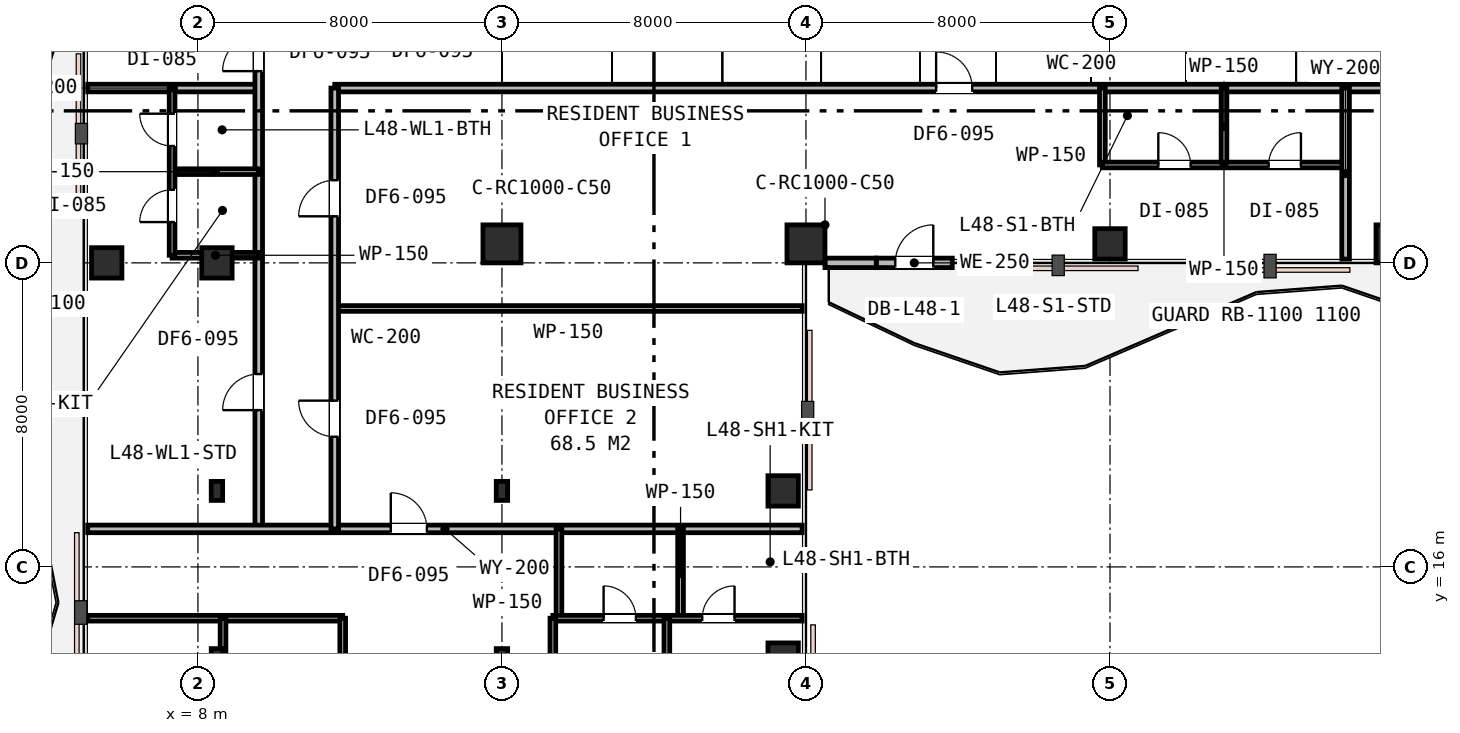
"""IFC4 building model, lengths in metres.
Left out: names, types, materials, properties, quantities, classifications, styles, units other than length and angle.
Written with IfcOpenShell. Run it as: python <this file> out.ifc"""

import sys

from ifc_helpers import new_model, si_unit, direction, frame, frame_2d, origin, origin_2d, place, context, subcontext, project, spatial, rectangle, i_section, extrude, element, fill, save


model = new_model("IFC4")
c1 = context("Model", 3, precision=1e-05, world=origin(), true_north=direction((0.0, 1.0)))
c2 = subcontext(c1, "Body", "Model", "MODEL_VIEW")
j1 = project(units=[si_unit("LENGTHUNIT", "METRE"), si_unit("PLANEANGLEUNIT", "RADIAN")], contexts=[c1])
p1 = place(None, origin())
s1 = spatial("IfcSite", under=j1, at=p1, CompositionType="ELEMENT")
p2 = place(p1, origin())
s2 = spatial("IfcBuilding", under=s1, at=p2, CompositionType="ELEMENT")
p3 = place(p2, frame((0.0, 0.0, 186.6)))
s3 = spatial("IfcBuildingStorey", under=s2, at=p3, CompositionType="ELEMENT", Elevation=186.6)
p4 = place(p3, frame((8.5, 24.0, 0.0), z_axis=(0.0, 0.0, 1.0), x_axis=(1.0, 0.0, 0.0)))
e1 = element("IfcColumn", 1, at=p4, inside=s3, PredefinedType="COLUMN", context=c2, shape_type="SweptSolid", body=[
    extrude(rectangle(XDim=0.8, YDim=0.8, at=origin_2d()), origin(), (0.0, 0.0, 1.0), 3.6),
])
for number, where, z_axis, x_axis in (
    (2, (16.0, 24.5, 0.0), (0.0, 0.0, 1.0), (1.0, 0.0, 0.0)),
    (3, (24.0, 24.5, 0.0), (0.0, 0.0, 1.0), (1.0, 0.0, 0.0)),
):
    element("IfcColumn", number, at=place(p3, frame(where, z_axis=z_axis, x_axis=x_axis)), inside=s3, PredefinedType="COLUMN", context=c2, shape_type="SweptSolid", body=[
        extrude(rectangle(XDim=1.0, YDim=1.0, at=origin_2d()), origin(), (0.0, 0.0, 1.0), 3.6),
    ])
p5 = place(p3, frame((32.0, 24.5, 0.0), z_axis=(0.0, 0.0, 1.0), x_axis=(1.0, 0.0, 0.0)))
e4 = element("IfcColumn", 4, at=p5, inside=s3, PredefinedType="COLUMN", context=c2, shape_type="SweptSolid", body=[
    extrude(rectangle(XDim=0.8, YDim=0.8, at=origin_2d()), origin(), (0.0, 0.0, 1.0), 3.6),
])
p6 = place(p3, frame((39.5, 24.5, 0.0), z_axis=(0.0, 0.0, 1.0), x_axis=(1.0, 0.0, 0.0)))
e5 = element("IfcColumn", 5, at=p6, inside=s3, PredefinedType="COLUMN", context=c2, shape_type="SweptSolid", body=[
    extrude(rectangle(XDim=1.0, YDim=1.0, at=origin_2d()), origin(), (0.0, 0.0, 1.0), 3.6),
])
for number, where, z_axis, x_axis in (
    (6, (5.6, 24.0, 0.0), (0.0, 0.0, 1.0), (1.0, 0.0, 0.0)),
    (7, (23.4, 13.6, 0.0), (0.0, 0.0, 1.0), (1.0, 0.0, 0.0)),
    (8, (23.4, 18.0, 0.0), (0.0, 0.0, 1.0), (1.0, 0.0, 0.0)),
):
    element("IfcColumn", number, at=place(p3, frame(where, z_axis=z_axis, x_axis=x_axis)), inside=s3, PredefinedType="COLUMN", context=c2, shape_type="SweptSolid", body=[
        extrude(rectangle(XDim=0.8, YDim=0.8, at=origin_2d()), origin(), (0.0, 0.0, 1.0), 3.6),
    ])
for number, where, z_axis, x_axis in (
    (9, (8.5, 13.6, 0.0), (0.0, 0.0, 1.0), (1.0, 0.0, 0.0)),
    (10, (16.0, 13.6, 0.0), (0.0, 0.0, 1.0), (1.0, 0.0, 0.0)),
    (11, (8.5, 18.0, 0.0), (0.0, 0.0, 1.0), (1.0, 0.0, 0.0)),
    (12, (16.0, 18.0, 0.0), (0.0, 0.0, 1.0), (1.0, 0.0, 0.0)),
):
    element("IfcColumn", number, at=place(p3, frame(where, z_axis=z_axis, x_axis=x_axis)), inside=s3, PredefinedType="COLUMN", context=c2, shape_type="SweptSolid", body=[
        extrude(i_section(OverallWidth=0.3, OverallDepth=0.5, WebThickness=0.015, FlangeThickness=0.028, FilletRadius=0.027, at=origin_2d()), origin(), (0.0, 0.0, 1.0), 3.6),
    ])
p7 = place(p3, frame((25.85, 24.0, 0.0), z_axis=(0.0, 0.0, 1.0), x_axis=(1.0, 0.0, 0.0)))
e13 = element("IfcWall", 13, at=p7, inside=s3, PredefinedType="STANDARD", context=c2, shape_type="SweptSolid", body=[
    extrude(rectangle(XDim=2.0, YDim=0.25, at=frame_2d((1.0, 0.0))), origin(), (0.0, 0.0, 1.0), 3.02),
])
p8 = place(p7, frame((0.5, 0.0, 0.0)))
e14 = element("IfcOpeningElement", 14, at=p8, cuts=e13, PredefinedType="OPENING", context=c2, shape_type="SweptSolid", body=[
    extrude(rectangle(XDim=1.0, YDim=2.15, at=frame_2d((0.5, 1.075))), frame((0.0, 0.135, 0.0), z_axis=(0.0, -1.0, 0.0), x_axis=(1.0, 0.0, 0.0)), (0.0, 0.0, 1.0), 0.27),
])
p9 = place(p3, frame((24.5, 24.0, 0.0), z_axis=(0.0, 0.0, 1.0), x_axis=(1.0, 0.0, 0.0)))
e15 = element("IfcWall", 15, at=p9, inside=s3, PredefinedType="STANDARD", context=c2, shape_type="SweptSolid", body=[
    extrude(rectangle(XDim=1.35, YDim=0.25, at=frame_2d((0.675, 0.0))), origin(), (0.0, 0.0, 1.0), 3.02),
])
p10 = place(p3, frame((5.1, 28.6, 0.0), z_axis=(0.0, 0.0, 1.0), x_axis=(1.0, 0.0, 0.0)))
e16 = element("IfcWall", 16, at=p10, inside=s3, PredefinedType="PARTITIONING", context=c2, shape_type="SweptSolid", body=[
    extrude(rectangle(XDim=4.5, YDim=0.2, at=frame_2d((2.25, 0.0))), origin(), (0.0, 0.0, 1.0), 2.92),
])
p11 = place(p3, frame((11.6, 28.6, 0.0), z_axis=(0.0, 0.0, 1.0), x_axis=(1.0, 0.0, 0.0)))
e17 = element("IfcWall", 17, at=p11, inside=s3, PredefinedType="PARTITIONING", context=c2, shape_type="SweptSolid", body=[
    extrude(rectangle(XDim=39.3, YDim=0.2, at=frame_2d((19.65, 0.0))), origin(), (0.0, 0.0, 1.0), 2.92),
])
p12 = place(p11, frame((15.825, 0.0, 0.0)))
e18 = element("IfcOpeningElement", 18, at=p12, cuts=e17, PredefinedType="OPENING", context=c2, shape_type="SweptSolid", body=[
    extrude(rectangle(XDim=0.95, YDim=2.15, at=frame_2d((0.475, 1.075))), frame((0.0, 0.11, 0.0), z_axis=(0.0, -1.0, 0.0), x_axis=(1.0, 0.0, 0.0)), (0.0, 0.0, 1.0), 0.22),
])
p13 = place(p11, frame((29.275, 0.0, 0.0)))
e19 = element("IfcOpeningElement", 19, at=p13, cuts=e17, PredefinedType="OPENING", context=c2, shape_type="SweptSolid", body=[
    extrude(rectangle(XDim=0.95, YDim=2.15, at=frame_2d((0.475, 1.075))), frame((0.0, 0.11, 0.0), z_axis=(0.0, -1.0, 0.0), x_axis=(1.0, 0.0, 0.0)), (0.0, 0.0, 1.0), 0.22),
])
p14 = place(p3, frame((9.6, 17.0, 0.0), z_axis=(0.0, 0.0, 1.0), x_axis=(0.0, 1.0, 0.0)))
e20 = element("IfcWall", 20, at=p14, inside=s3, PredefinedType="PARTITIONING", context=c2, shape_type="SweptSolid", body=[
    extrude(rectangle(XDim=25.9, YDim=0.2, at=frame_2d((12.95, 0.0))), origin(), (0.0, 0.0, 1.0), 2.92),
])
p15 = place(p14, frame((12.045, 0.0, 0.0)))
e21 = element("IfcOpeningElement", 21, at=p15, cuts=e20, PredefinedType="OPENING", context=c2, shape_type="SweptSolid", body=[
    extrude(rectangle(XDim=0.95, YDim=2.15, at=frame_2d((0.475, 1.075))), frame((0.0, 0.11, 0.0), z_axis=(0.0, -1.0, 0.0), x_axis=(1.0, 0.0, 0.0)), (0.0, 0.0, 1.0), 0.22),
])
p16 = place(p14, frame((3.125, 0.0, 0.0)))
e22 = element("IfcOpeningElement", 22, at=p16, cuts=e20, PredefinedType="OPENING", context=c2, shape_type="SweptSolid", body=[
    extrude(rectangle(XDim=0.95, YDim=2.15, at=frame_2d((0.475, 1.075))), frame((0.0, 0.11, 0.0), z_axis=(0.0, -1.0, 0.0), x_axis=(1.0, 0.0, 0.0)), (0.0, 0.0, 1.0), 0.22),
])
p17 = place(p3, frame((31.8, 26.576, 0.0), z_axis=(0.0, 0.0, 1.0), x_axis=(0.0, 1.0, 0.0)))
e23 = element("IfcWall", 23, at=p17, inside=s3, PredefinedType="PARTITIONING", context=c2, shape_type="SweptSolid", body=[
    extrude(rectangle(XDim=2.024, YDim=0.15, at=frame_2d((1.012, 0.0))), origin(), (0.0, 0.0, 1.0), 2.92),
])
p18 = place(p3, frame((35.0, 26.576, 0.0), z_axis=(0.0, 0.0, 1.0), x_axis=(0.0, 1.0, 0.0)))
e24 = element("IfcWall", 24, at=p18, inside=s3, PredefinedType="PARTITIONING", context=c2, shape_type="SweptSolid", body=[
    extrude(rectangle(XDim=2.024, YDim=0.15, at=frame_2d((1.012, 0.0))), origin(), (0.0, 0.0, 1.0), 3.07),
])
p19 = place(p3, frame((31.8, 26.576, 0.0), z_axis=(0.0, 0.0, 1.0), x_axis=(1.0, 0.0, 0.0)))
e25 = element("IfcWall", 25, at=p19, inside=s3, PredefinedType="PARTITIONING", context=c2, shape_type="SweptSolid", body=[
    extrude(rectangle(XDim=6.4, YDim=0.15, at=frame_2d((3.2, 0.0))), origin(), (0.0, 0.0, 1.0), 2.92),
])
p20 = place(p19, frame((1.472, 0.0, 0.0)))
e26 = element("IfcOpeningElement", 26, at=p20, cuts=e25, PredefinedType="OPENING", context=c2, shape_type="SweptSolid", body=[
    extrude(rectangle(XDim=0.85, YDim=2.15, at=frame_2d((0.425, 1.075))), frame((0.0, 0.085, 0.0), z_axis=(0.0, -1.0, 0.0), x_axis=(1.0, 0.0, 0.0)), (0.0, 0.0, 1.0), 0.17),
])
p21 = place(p19, frame((4.375, 0.0, 0.0)))
e27 = element("IfcOpeningElement", 27, at=p21, cuts=e25, PredefinedType="OPENING", context=c2, shape_type="SweptSolid", body=[
    extrude(rectangle(XDim=0.85, YDim=2.15, at=frame_2d((0.425, 1.075))), frame((0.0, 0.085, 0.0), z_axis=(0.0, -1.0, 0.0), x_axis=(1.0, 0.0, 0.0)), (0.0, 0.0, 1.0), 0.17),
])
p22 = place(p3, frame((38.2, 24.1, 0.0), z_axis=(0.0, 0.0, 1.0), x_axis=(0.0, 1.0, 0.0)))
e28 = element("IfcWall", 28, at=p22, inside=s3, PredefinedType="PARTITIONING", context=c2, shape_type="SweptSolid", body=[
    extrude(rectangle(XDim=4.5, YDim=0.2, at=frame_2d((2.25, 0.0))), origin(), (0.0, 0.0, 1.0), 3.02),
])
p23 = place(p3, frame((5.1, 17.0, 0.0), z_axis=(0.0, 0.0, 1.0), x_axis=(1.0, 0.0, 0.0)))
e29 = element("IfcWall", 29, at=p23, inside=s3, PredefinedType="PARTITIONING", context=c2, shape_type="SweptSolid", body=[
    extrude(rectangle(XDim=18.8, YDim=0.2, at=frame_2d((9.4, 0.0))), origin(), (0.0, 0.0, 1.0), 2.92),
])
p24 = place(p23, frame((7.975, 0.0, 0.0)))
e30 = element("IfcOpeningElement", 30, at=p24, cuts=e29, PredefinedType="OPENING", context=c2, shape_type="SweptSolid", body=[
    extrude(rectangle(XDim=0.95, YDim=2.15, at=frame_2d((0.475, 1.075))), frame((0.0, 0.11, 0.0), z_axis=(0.0, -1.0, 0.0), x_axis=(1.0, 0.0, 0.0)), (0.0, 0.0, 1.0), 0.22),
])
for number, where, z_axis, x_axis in (
    (31, (7.32, 24.2, 0.0), (0.0, 0.0, 1.0), (1.0, 0.0, 0.0)),
    (32, (7.32, 26.4, 0.0), (0.0, 0.0, 1.0), (1.0, 0.0, 0.0)),
):
    element("IfcWall", number, at=place(p3, frame(where, z_axis=z_axis, x_axis=x_axis)), inside=s3, PredefinedType="PARTITIONING", context=c2, shape_type="SweptSolid", body=[
        extrude(rectangle(XDim=2.28, YDim=0.15, at=frame_2d((1.14, 0.0))), origin(), (0.0, 0.0, 1.0), 2.92),
    ])
p25 = place(p3, frame((7.32, 24.2, 0.0), z_axis=(0.0, 0.0, 1.0), x_axis=(0.0, 1.0, 0.0)))
e33 = element("IfcWall", 33, at=p25, inside=s3, PredefinedType="PARTITIONING", context=c2, shape_type="SweptSolid", body=[
    extrude(rectangle(XDim=4.4, YDim=0.15, at=frame_2d((2.2, 0.0))), origin(), (0.0, 0.0, 1.0), 2.92),
])
p26 = place(p25, frame((0.873, 0.0, 0.0)))
e34 = element("IfcOpeningElement", 34, at=p26, cuts=e33, PredefinedType="OPENING", context=c2, shape_type="SweptSolid", body=[
    extrude(rectangle(XDim=0.85, YDim=2.15, at=frame_2d((0.425, 1.075))), frame((0.0, 0.085, 0.0), z_axis=(0.0, -1.0, 0.0), x_axis=(1.0, 0.0, 0.0)), (0.0, 0.0, 1.0), 0.17),
])
p27 = place(p25, frame((2.875, 0.0, 0.0)))
e35 = element("IfcOpeningElement", 35, at=p27, cuts=e33, PredefinedType="OPENING", context=c2, shape_type="SweptSolid", body=[
    extrude(rectangle(XDim=0.85, YDim=2.15, at=frame_2d((0.425, 1.075))), frame((0.0, 0.085, 0.0), z_axis=(0.0, -1.0, 0.0), x_axis=(1.0, 0.0, 0.0)), (0.0, 0.0, 1.0), 0.17),
])
p28 = place(p3, frame((11.6, 22.8, 0.0), z_axis=(0.0, 0.0, 1.0), x_axis=(1.0, 0.0, 0.0)))
e36 = element("IfcWall", 36, at=p28, inside=s3, PredefinedType="PARTITIONING", context=c2, shape_type="SweptSolid", body=[
    extrude(rectangle(XDim=12.3, YDim=0.15, at=frame_2d((6.15, 0.0))), origin(), (0.0, 0.0, 1.0), 2.92),
])
p29 = place(p3, frame((11.6, 17.0, 0.0), z_axis=(0.0, 0.0, 1.0), x_axis=(0.0, 1.0, 0.0)))
e37 = element("IfcWall", 37, at=p29, inside=s3, PredefinedType="PARTITIONING", context=c2, shape_type="SweptSolid", body=[
    extrude(rectangle(XDim=11.6, YDim=0.2, at=frame_2d((5.8, 0.0))), origin(), (0.0, 0.0, 1.0), 2.92),
])
p30 = place(p29, frame((8.225, 0.0, 0.0)))
e38 = element("IfcOpeningElement", 38, at=p30, cuts=e37, PredefinedType="OPENING", context=c2, shape_type="SweptSolid", body=[
    extrude(rectangle(XDim=0.95, YDim=2.15, at=frame_2d((0.475, 1.075))), frame((0.0, 0.11, 0.0), z_axis=(0.0, -1.0, 0.0), x_axis=(1.0, 0.0, 0.0)), (0.0, 0.0, 1.0), 0.22),
])
p31 = place(p29, frame((2.425, 0.0, 0.0)))
e39 = element("IfcOpeningElement", 39, at=p31, cuts=e37, PredefinedType="OPENING", context=c2, shape_type="SweptSolid", body=[
    extrude(rectangle(XDim=0.95, YDim=2.15, at=frame_2d((0.475, 1.075))), frame((0.0, 0.11, 0.0), z_axis=(0.0, -1.0, 0.0), x_axis=(1.0, 0.0, 0.0)), (0.0, 0.0, 1.0), 0.22),
])
p32 = place(p3, frame((17.5, 14.65, 0.0), z_axis=(0.0, 0.0, 1.0), x_axis=(0.0, 1.0, 0.0)))
e40 = element("IfcWall", 40, at=p32, inside=s3, PredefinedType="PARTITIONING", context=c2, shape_type="SweptSolid", body=[
    extrude(rectangle(XDim=2.35, YDim=0.15, at=frame_2d((1.175, 0.0))), origin(), (0.0, 0.0, 1.0), 3.33),
])
p33 = place(p3, frame((20.7, 14.65, 0.0), z_axis=(0.0, 0.0, 1.0), x_axis=(0.0, 1.0, 0.0)))
e41 = element("IfcWall", 41, at=p33, inside=s3, PredefinedType="PARTITIONING", context=c2, shape_type="SweptSolid", body=[
    extrude(rectangle(XDim=2.35, YDim=0.15, at=frame_2d((1.175, 0.0))), origin(), (0.0, 0.0, 1.0), 3.07),
])
p34 = place(p3, frame((17.34, 14.65, 0.0), z_axis=(0.0, 0.0, 1.0), x_axis=(1.0, 0.0, 0.0)))
e42 = element("IfcWall", 42, at=p34, inside=s3, PredefinedType="PARTITIONING", context=c2, shape_type="SweptSolid", body=[
    extrude(rectangle(XDim=6.56, YDim=0.15, at=frame_2d((3.28, 0.0))), origin(), (0.0, 0.0, 1.0), 3.02),
])
p35 = place(p34, frame((1.335, 0.0, 0.0)))
e43 = element("IfcOpeningElement", 43, at=p35, cuts=e42, PredefinedType="OPENING", context=c2, shape_type="SweptSolid", body=[
    extrude(rectangle(XDim=0.85, YDim=2.15, at=frame_2d((0.425, 1.075))), frame((0.0, 0.085, 0.0), z_axis=(0.0, -1.0, 0.0), x_axis=(1.0, 0.0, 0.0)), (0.0, 0.0, 1.0), 0.17),
])
p36 = place(p34, frame((3.93, 0.0, 0.0)))
e44 = element("IfcOpeningElement", 44, at=p36, cuts=e42, PredefinedType="OPENING", context=c2, shape_type="SweptSolid", body=[
    extrude(rectangle(XDim=0.85, YDim=2.15, at=frame_2d((0.425, 1.075))), frame((0.0, 0.085, 0.0), z_axis=(0.0, -1.0, 0.0), x_axis=(1.0, 0.0, 0.0)), (0.0, 0.0, 1.0), 0.17),
])
p37 = place(p3, frame((5.1, 14.65, 0.0), z_axis=(0.0, 0.0, 1.0), x_axis=(1.0, 0.0, 0.0)))
e45 = element("IfcWall", 45, at=p37, inside=s3, PredefinedType="PARTITIONING", context=c2, shape_type="SweptSolid", body=[
    extrude(rectangle(XDim=6.71, YDim=0.15, at=frame_2d((3.355, 0.0))), origin(), (0.0, 0.0, 1.0), 2.92),
])
p38 = place(p3, frame((8.66, 5.1, 0.0), z_axis=(0.0, 0.0, 1.0), x_axis=(0.0, 1.0, 0.0)))
e46 = element("IfcWall", 46, at=p38, inside=s3, PredefinedType="PARTITIONING", context=c2, shape_type="SweptSolid", body=[
    extrude(rectangle(XDim=9.55, YDim=0.15, at=frame_2d((4.775, 0.0))), origin(), (0.0, 0.0, 1.0), 2.92),
])
p39 = place(p38, frame((4.779, 0.0, 0.0)))
e47 = element("IfcOpeningElement", 47, at=p39, cuts=e46, PredefinedType="OPENING", context=c2, shape_type="SweptSolid", body=[
    extrude(rectangle(XDim=0.9, YDim=2.15, at=frame_2d((0.45, 1.075))), frame((0.0, 0.085, 0.0), z_axis=(0.0, -1.0, 0.0), x_axis=(1.0, 0.0, 0.0)), (0.0, 0.0, 1.0), 0.17),
])
p40 = place(p3, frame((20.34, 5.1, 0.0), z_axis=(0.0, 0.0, 1.0), x_axis=(0.0, 1.0, 0.0)))
e48 = element("IfcWall", 48, at=p40, inside=s3, PredefinedType="PARTITIONING", context=c2, shape_type="SweptSolid", body=[
    extrude(rectangle(XDim=9.55, YDim=0.15, at=frame_2d((4.775, 0.0))), origin(), (0.0, 0.0, 1.0), 2.92),
])
p41 = place(p40, frame((4.325, 0.0, 0.0)))
e49 = element("IfcOpeningElement", 49, at=p41, cuts=e48, PredefinedType="OPENING", context=c2, shape_type="SweptSolid", body=[
    extrude(rectangle(XDim=0.9, YDim=2.15, at=frame_2d((0.45, 1.075))), frame((0.0, 0.085, 0.0), z_axis=(0.0, -1.0, 0.0), x_axis=(1.0, 0.0, 0.0)), (0.0, 0.0, 1.0), 0.17),
])
p42 = place(p3, frame((17.34, 5.1, 0.0), z_axis=(0.0, 0.0, 1.0), x_axis=(0.0, 1.0, 0.0)))
e50 = element("IfcWall", 50, at=p42, inside=s3, PredefinedType="PARTITIONING", context=c2, shape_type="SweptSolid", body=[
    extrude(rectangle(XDim=9.55, YDim=0.15, at=frame_2d((4.775, 0.0))), origin(), (0.0, 0.0, 1.0), 2.92),
])
p43 = place(p42, frame((4.779, 0.0, 0.0)))
e51 = element("IfcOpeningElement", 51, at=p43, cuts=e50, PredefinedType="OPENING", context=c2, shape_type="SweptSolid", body=[
    extrude(rectangle(XDim=0.9, YDim=2.15, at=frame_2d((0.45, 1.075))), frame((0.0, 0.085, 0.0), z_axis=(0.0, -1.0, 0.0), x_axis=(1.0, 0.0, 0.0)), (0.0, 0.0, 1.0), 0.17),
])
p44 = place(p3, frame((11.81, 5.1, 0.0), z_axis=(0.0, 0.0, 1.0), x_axis=(0.0, 1.0, 0.0)))
e52 = element("IfcWall", 52, at=p44, inside=s3, PredefinedType="PARTITIONING", context=c2, shape_type="SweptSolid", body=[
    extrude(rectangle(XDim=9.55, YDim=0.15, at=frame_2d((4.775, 0.0))), origin(), (0.0, 0.0, 1.0), 2.92),
])
p45 = place(p44, frame((4.325, 0.0, 0.0)))
e53 = element("IfcOpeningElement", 53, at=p45, cuts=e52, PredefinedType="OPENING", context=c2, shape_type="SweptSolid", body=[
    extrude(rectangle(XDim=0.9, YDim=2.15, at=frame_2d((0.45, 1.075))), frame((0.0, 0.085, 0.0), z_axis=(0.0, -1.0, 0.0), x_axis=(1.0, 0.0, 0.0)), (0.0, 0.0, 1.0), 0.17),
])
p46 = place(p8, origin())
e54 = element("IfcDoor", 54, at=p46, inside=s3, OperationType="SINGLE_SWING_RIGHT", PredefinedType="DOOR", context=c2, shape_type="SweptSolid", body=[
    extrude(rectangle(XDim=1.0, YDim=2.15, at=frame_2d((0.5, 1.075))), frame((0.0, 0.025, 0.0), z_axis=(0.0, -1.0, 0.0), x_axis=(1.0, 0.0, 0.0)), (0.0, 0.0, 1.0), 0.05),
])
fill(e14, e54)
p47 = place(p15, origin())
e55 = element("IfcDoor", 55, at=p47, inside=s3, OperationType="SINGLE_SWING_LEFT", PredefinedType="DOOR", context=c2, shape_type="SweptSolid", body=[
    extrude(rectangle(XDim=0.95, YDim=2.15, at=frame_2d((0.475, 1.075))), frame((0.0, 0.025, 0.0), z_axis=(0.0, -1.0, 0.0), x_axis=(1.0, 0.0, 0.0)), (0.0, 0.0, 1.0), 0.05),
])
fill(e21, e55)
p48 = place(p12, origin())
e56 = element("IfcDoor", 56, at=p48, inside=s3, OperationType="SINGLE_SWING_LEFT", PredefinedType="DOOR", context=c2, shape_type="SweptSolid", body=[
    extrude(rectangle(XDim=0.95, YDim=2.15, at=frame_2d((0.475, 1.075))), frame((0.0, 0.025, 0.0), z_axis=(0.0, -1.0, 0.0), x_axis=(1.0, 0.0, 0.0)), (0.0, 0.0, 1.0), 0.05),
])
fill(e18, e56)
p49 = place(p20, origin())
e57 = element("IfcDoor", 57, at=p49, inside=s3, OperationType="SINGLE_SWING_LEFT", PredefinedType="DOOR", context=c2, shape_type="SweptSolid", body=[
    extrude(rectangle(XDim=0.85, YDim=2.15, at=frame_2d((0.425, 1.075))), frame((0.0, 0.025, 0.0), z_axis=(0.0, -1.0, 0.0), x_axis=(1.0, 0.0, 0.0)), (0.0, 0.0, 1.0), 0.05),
])
fill(e26, e57)
p50 = place(p21, origin())
e58 = element("IfcDoor", 58, at=p50, inside=s3, OperationType="SINGLE_SWING_RIGHT", PredefinedType="DOOR", context=c2, shape_type="SweptSolid", body=[
    extrude(rectangle(XDim=0.85, YDim=2.15, at=frame_2d((0.425, 1.075))), frame((0.0, 0.025, 0.0), z_axis=(0.0, -1.0, 0.0), x_axis=(1.0, 0.0, 0.0)), (0.0, 0.0, 1.0), 0.05),
])
fill(e27, e58)
p51 = place(p16, origin())
e59 = element("IfcDoor", 59, at=p51, inside=s3, OperationType="SINGLE_SWING_LEFT", PredefinedType="DOOR", context=c2, shape_type="SweptSolid", body=[
    extrude(rectangle(XDim=0.95, YDim=2.15, at=frame_2d((0.475, 1.075))), frame((0.0, 0.025, 0.0), z_axis=(0.0, -1.0, 0.0), x_axis=(1.0, 0.0, 0.0)), (0.0, 0.0, 1.0), 0.05),
])
fill(e22, e59)
p52 = place(p26, origin())
e60 = element("IfcDoor", 60, at=p52, inside=s3, OperationType="SINGLE_SWING_LEFT", PredefinedType="DOOR", context=c2, shape_type="SweptSolid", body=[
    extrude(rectangle(XDim=0.85, YDim=2.15, at=frame_2d((0.425, 1.075))), frame((0.0, 0.025, 0.0), z_axis=(0.0, -1.0, 0.0), x_axis=(1.0, 0.0, 0.0)), (0.0, 0.0, 1.0), 0.05),
])
fill(e34, e60)
p53 = place(p27, origin())
e61 = element("IfcDoor", 61, at=p53, inside=s3, OperationType="SINGLE_SWING_RIGHT", PredefinedType="DOOR", context=c2, shape_type="SweptSolid", body=[
    extrude(rectangle(XDim=0.85, YDim=2.15, at=frame_2d((0.425, 1.075))), frame((0.0, 0.025, 0.0), z_axis=(0.0, -1.0, 0.0), x_axis=(1.0, 0.0, 0.0)), (0.0, 0.0, 1.0), 0.05),
])
fill(e35, e61)
p54 = place(p30, origin())
e62 = element("IfcDoor", 62, at=p54, inside=s3, OperationType="SINGLE_SWING_LEFT", PredefinedType="DOOR", context=c2, shape_type="SweptSolid", body=[
    extrude(rectangle(XDim=0.95, YDim=2.15, at=frame_2d((0.475, 1.075))), frame((0.0, 0.025, 0.0), z_axis=(0.0, -1.0, 0.0), x_axis=(1.0, 0.0, 0.0)), (0.0, 0.0, 1.0), 0.05),
])
fill(e38, e62)
p55 = place(p31, origin())
e63 = element("IfcDoor", 63, at=p55, inside=s3, OperationType="SINGLE_SWING_RIGHT", PredefinedType="DOOR", context=c2, shape_type="SweptSolid", body=[
    extrude(rectangle(XDim=0.95, YDim=2.15, at=frame_2d((0.475, 1.075))), frame((0.0, 0.025, 0.0), z_axis=(0.0, -1.0, 0.0), x_axis=(1.0, 0.0, 0.0)), (0.0, 0.0, 1.0), 0.05),
])
fill(e39, e63)
p56 = place(p24, origin())
e64 = element("IfcDoor", 64, at=p56, inside=s3, OperationType="SINGLE_SWING_LEFT", PredefinedType="DOOR", context=c2, shape_type="SweptSolid", body=[
    extrude(rectangle(XDim=0.95, YDim=2.15, at=frame_2d((0.475, 1.075))), frame((0.0, 0.025, 0.0), z_axis=(0.0, -1.0, 0.0), x_axis=(1.0, 0.0, 0.0)), (0.0, 0.0, 1.0), 0.05),
])
fill(e30, e64)
p57 = place(p35, origin())
e65 = element("IfcDoor", 65, at=p57, inside=s3, OperationType="SINGLE_SWING_LEFT", PredefinedType="DOOR", context=c2, shape_type="SweptSolid", body=[
    extrude(rectangle(XDim=0.85, YDim=2.15, at=frame_2d((0.425, 1.075))), frame((0.0, 0.025, 0.0), z_axis=(0.0, -1.0, 0.0), x_axis=(1.0, 0.0, 0.0)), (0.0, 0.0, 1.0), 0.05),
])
fill(e43, e65)
p58 = place(p36, origin())
e66 = element("IfcDoor", 66, at=p58, inside=s3, OperationType="SINGLE_SWING_RIGHT", PredefinedType="DOOR", context=c2, shape_type="SweptSolid", body=[
    extrude(rectangle(XDim=0.85, YDim=2.15, at=frame_2d((0.425, 1.075))), frame((0.0, 0.025, 0.0), z_axis=(0.0, -1.0, 0.0), x_axis=(1.0, 0.0, 0.0)), (0.0, 0.0, 1.0), 0.05),
])
fill(e44, e66)
save(model, sys.argv[1])
